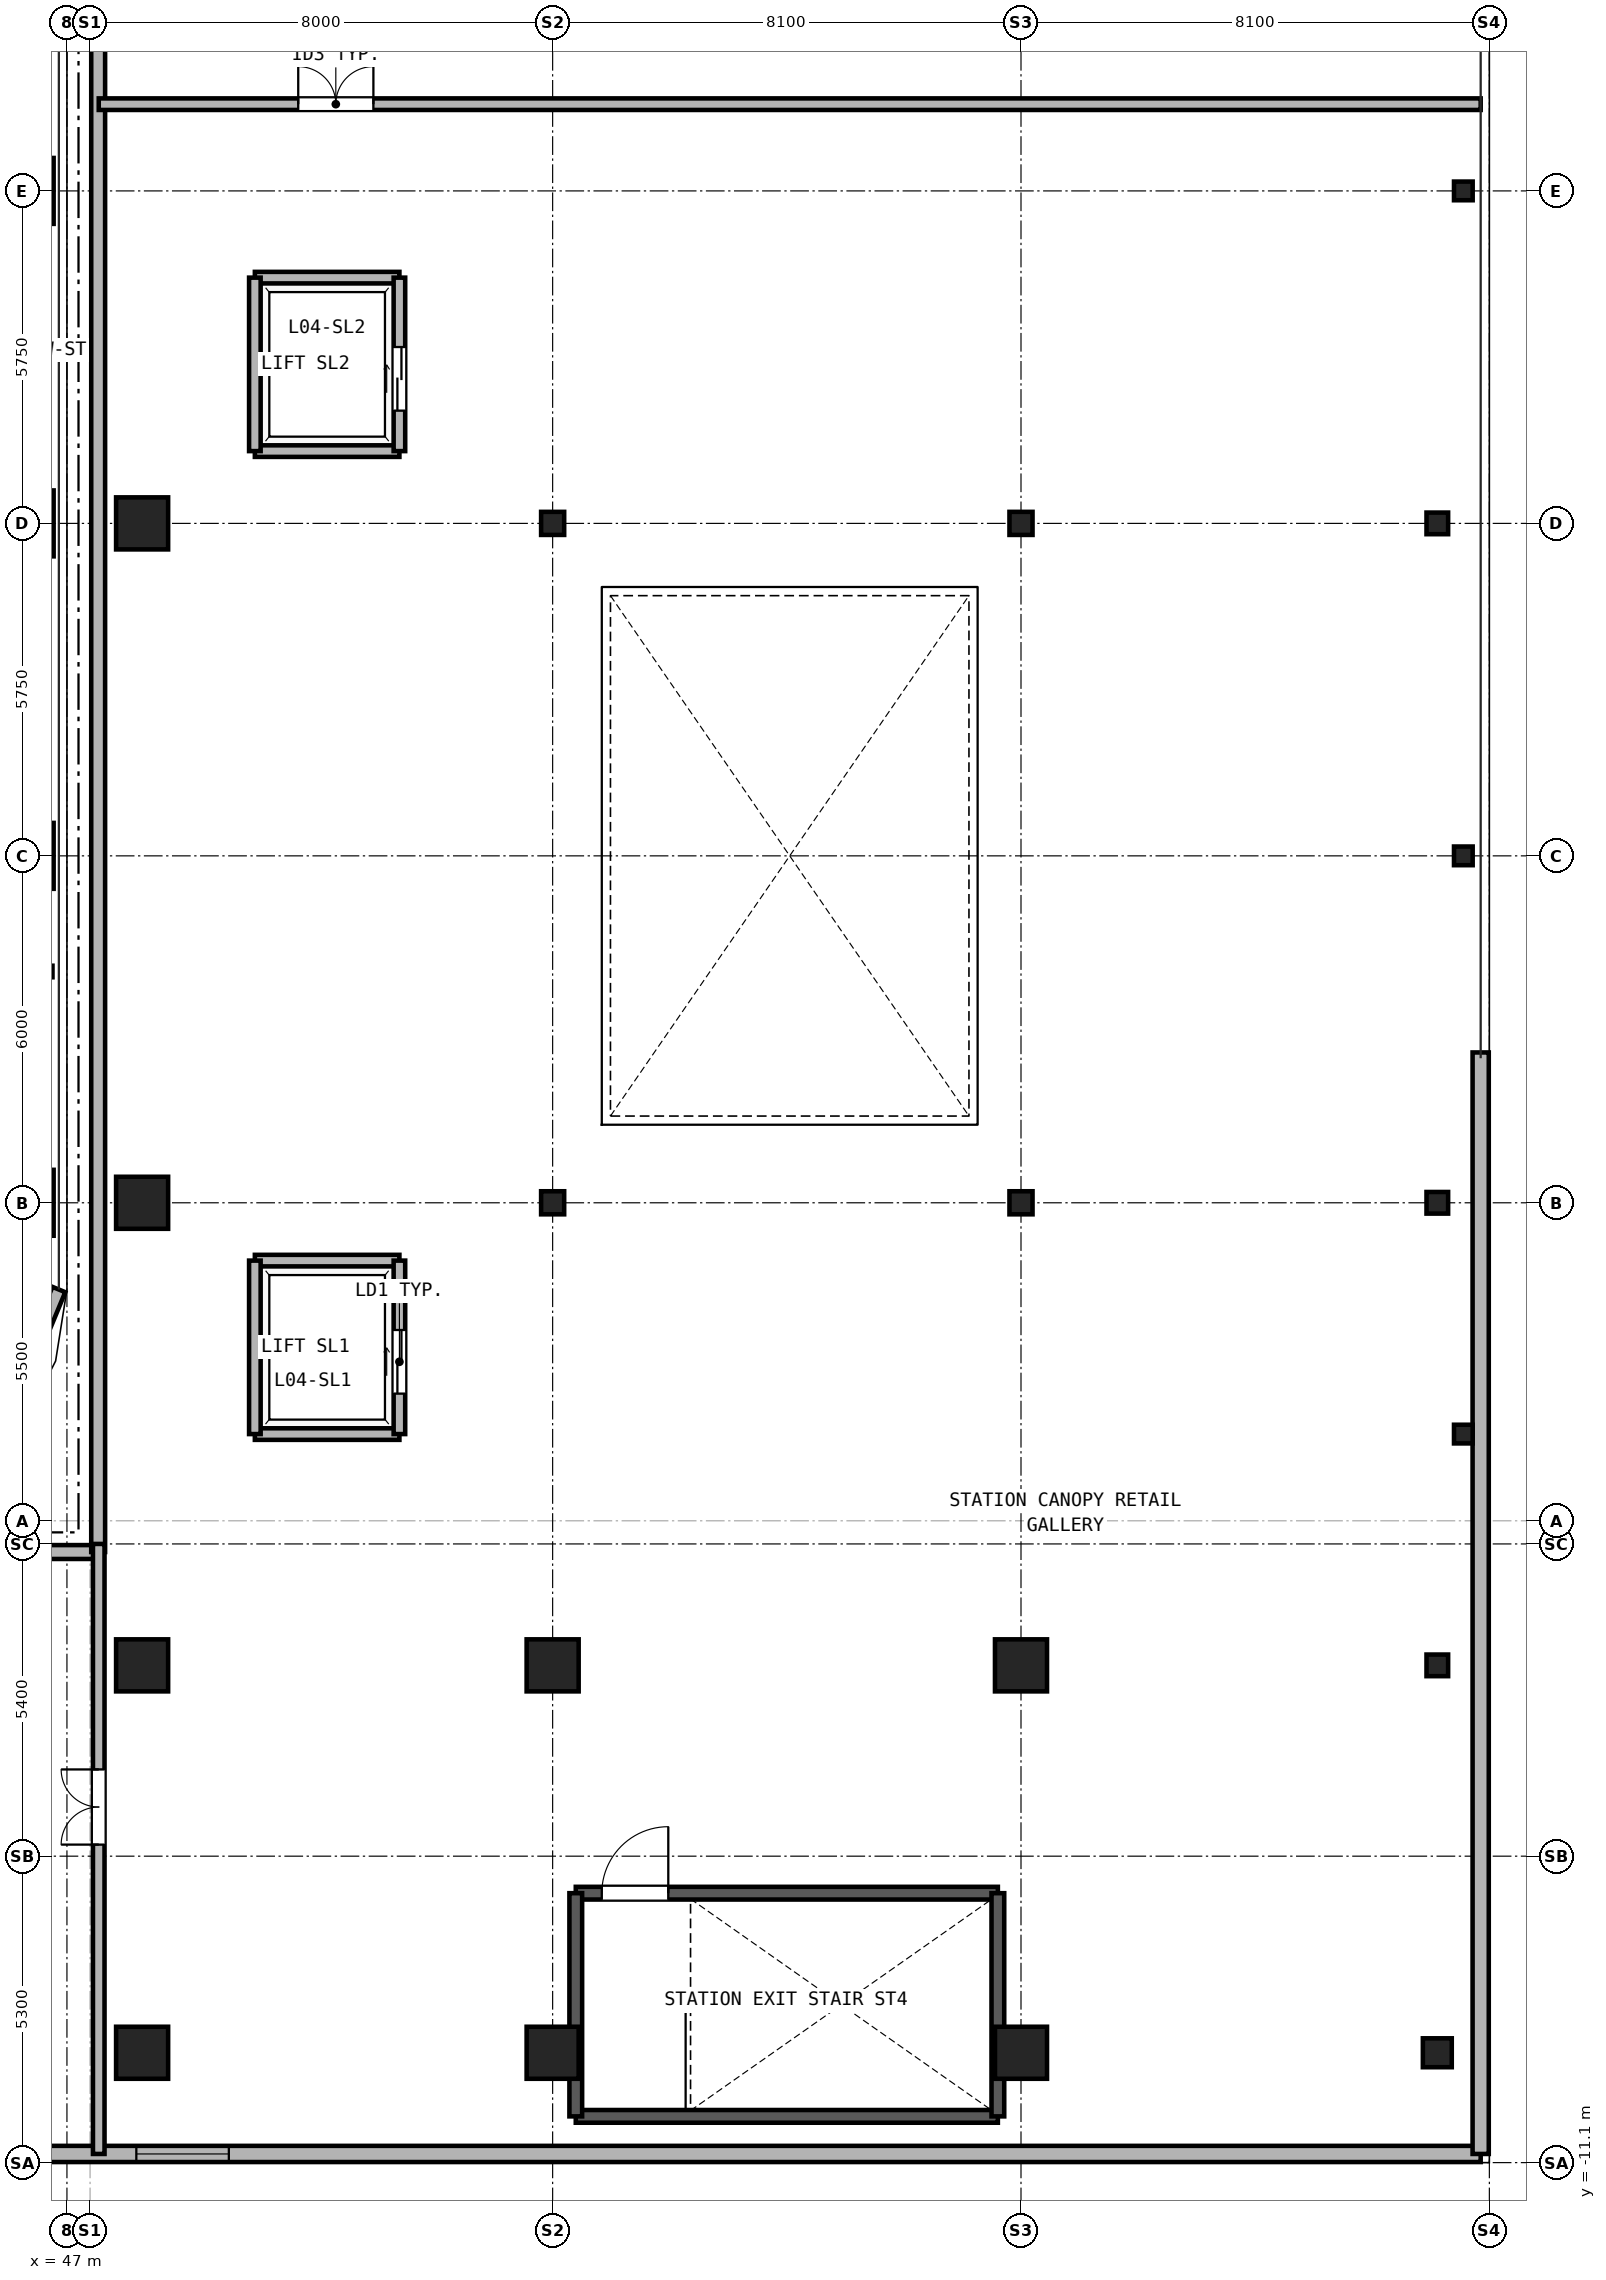
"""IFC4 building model, lengths in metres.
Left out: names, types, materials, properties, quantities, classifications, styles, units other than length and angle.
Written with IfcOpenShell. Run it as: python <this file> out.ifc"""

import sys

from ifc_helpers import new_model, si_unit, direction, frame, frame_2d, origin, origin_2d, place, context, subcontext, project, spatial, rectangle, hollow_rectangle, i_section, extrude, source, transform, mapped, element, fill, save


model = new_model("IFC4")
c1 = context("Model", 3, precision=1e-05, world=origin(), true_north=direction((0.0, 1.0)))
c2 = subcontext(c1, "Body", "Model", "MODEL_VIEW")
j1 = project(units=[si_unit("LENGTHUNIT", "METRE"), si_unit("PLANEANGLEUNIT", "RADIAN")], contexts=[c1])
p1 = place(None, origin())
s1 = spatial("IfcSite", under=j1, at=p1, CompositionType="ELEMENT")
p2 = place(p1, origin())
s2 = spatial("IfcBuilding", under=s1, at=p2, CompositionType="ELEMENT")
p3 = place(p2, frame((0.0, 0.0, 18.0)))
s3 = spatial("IfcBuildingStorey", under=s2, at=p3, CompositionType="ELEMENT", Elevation=18.0)
m1 = source(origin(), c2, "Body", "SweptSolid", [
    extrude(hollow_rectangle(XDim=1.14, YDim=1.14, WallThickness=0.07, at=origin_2d()), origin(), (0.0, 0.0, 1.0), 4.14),
])
for number, where, z_axis, x_axis in (
    (1, (46.2, 5.5, 0.0), (0.0, 0.0, 1.0), (1.0, 0.0, 0.0)),
    (2, (46.2, 11.5, 0.0), (0.0, 0.0, 1.0), (1.0, 0.0, 0.0)),
    (3, (46.2, 17.25, 0.0), (0.0, 0.0, 1.0), (1.0, 0.0, 0.0)),
    (4, (46.2, 23.0, 0.0), (0.0, 0.0, 1.0), (1.0, 0.0, 0.0)),
):
    element("IfcColumn", number, at=place(p3, frame(where, z_axis=z_axis, x_axis=x_axis)), inside=s3, PredefinedType="COLUMN", context=c2, shape_type="MappedRepresentation", body=[
        mapped(m1, transform((0.0, 0.0, 0.0), x_axis=(1.0, 0.0, 0.0), y_axis=(0.0, 1.0, 0.0), z_axis=(0.0, 0.0, 1.0), scale=1.0)),
    ])
m2 = source(origin(), c2, "Body", "SweptSolid", [
    extrude(hollow_rectangle(XDim=0.7, YDim=0.9, WallThickness=0.04, at=origin_2d()), origin(), (0.0, 0.0, 1.0), 4.2),
])
for number, where, z_axis, x_axis in (
    (5, (48.3, -9.2, 0.0), (0.0, 0.0, 1.0), (1.0, 0.0, 0.0)),
    (6, (48.3, -2.5, 0.0), (0.0, 0.0, 1.0), (1.0, 0.0, 0.0)),
    (7, (48.3, 5.5, 0.0), (0.0, 0.0, 1.0), (1.0, 0.0, 0.0)),
    (8, (48.3, 17.25, 0.0), (0.0, 0.0, 1.0), (1.0, 0.0, 0.0)),
    (9, (55.4, -9.2, 0.0), (0.0, 0.0, 1.0), (1.0, 0.0, 0.0)),
    (10, (55.4, -2.5, 0.0), (0.0, 0.0, 1.0), (1.0, 0.0, 0.0)),
):
    element("IfcColumn", number, at=place(p3, frame(where, z_axis=z_axis, x_axis=x_axis)), inside=s3, PredefinedType="COLUMN", context=c2, shape_type="MappedRepresentation", body=[
        mapped(m2, transform((0.0, 0.0, 0.0), x_axis=(1.0, 0.0, 0.0), y_axis=(0.0, 1.0, 0.0), z_axis=(0.0, 0.0, 1.0), scale=1.0)),
    ])
m3 = source(origin(), c2, "Body", "SweptSolid", [
    extrude(i_section(OverallWidth=0.399, OverallDepth=0.393, WebThickness=0.023, FlangeThickness=0.037, at=origin_2d()), origin(), (0.0, 0.0, 1.0), 4.2),
])
for number, where, z_axis, x_axis in (
    (11, (55.4, 5.5, 0.0), (0.0, 0.0, 1.0), (1.0, 0.0, 0.0)),
    (12, (55.4, 17.25, 0.0), (0.0, 0.0, 1.0), (1.0, 0.0, 0.0)),
):
    element("IfcColumn", number, at=place(p3, frame(where, z_axis=z_axis, x_axis=x_axis)), inside=s3, PredefinedType="COLUMN", context=c2, shape_type="MappedRepresentation", body=[
        mapped(m3, transform((0.0, 0.0, 0.0), x_axis=(1.0, 0.0, 0.0), y_axis=(0.0, 1.0, 0.0), z_axis=(0.0, 0.0, 1.0), scale=1.0)),
    ])
for number, where, z_axis, x_axis in (
    (13, (63.5, -9.2, 0.0), (0.0, 0.0, 1.0), (1.0, 0.0, 0.0)),
    (14, (63.5, -2.5, 0.0), (0.0, 0.0, 1.0), (1.0, 0.0, 0.0)),
):
    element("IfcColumn", number, at=place(p3, frame(where, z_axis=z_axis, x_axis=x_axis)), inside=s3, PredefinedType="COLUMN", context=c2, shape_type="MappedRepresentation", body=[
        mapped(m2, transform((0.0, 0.0, 0.0), x_axis=(1.0, 0.0, 0.0), y_axis=(0.0, 1.0, 0.0), z_axis=(0.0, 0.0, 1.0), scale=1.0)),
    ])
for number, where, z_axis, x_axis in (
    (15, (63.5, 5.5, 0.0), (0.0, 0.0, 1.0), (1.0, 0.0, 0.0)),
    (16, (63.5, 17.25, 0.0), (0.0, 0.0, 1.0), (1.0, 0.0, 0.0)),
):
    element("IfcColumn", number, at=place(p3, frame(where, z_axis=z_axis, x_axis=x_axis)), inside=s3, PredefinedType="COLUMN", context=c2, shape_type="MappedRepresentation", body=[
        mapped(m3, transform((0.0, 0.0, 0.0), x_axis=(1.0, 0.0, 0.0), y_axis=(0.0, 1.0, 0.0), z_axis=(0.0, 0.0, 1.0), scale=1.0)),
    ])
m4 = source(origin(), c2, "Body", "SweptSolid", [
    extrude(hollow_rectangle(XDim=0.5, YDim=0.5, WallThickness=0.025, at=origin_2d()), origin(), (0.0, 0.0, 1.0), 4.2),
])
p4 = place(p3, frame((70.7, -9.2, 0.0), z_axis=(0.0, 0.0, 1.0), x_axis=(1.0, 0.0, 0.0)))
e17 = element("IfcColumn", 17, at=p4, inside=s3, PredefinedType="COLUMN", context=c2, shape_type="MappedRepresentation", body=[
    mapped(m4, transform((0.0, 0.0, 0.0), x_axis=(1.0, 0.0, 0.0), y_axis=(0.0, 1.0, 0.0), z_axis=(0.0, 0.0, 1.0), scale=1.0)),
])
m5 = source(origin(), c2, "Body", "SweptSolid", [
    extrude(i_section(OverallWidth=0.374, OverallDepth=0.372, WebThickness=0.016, FlangeThickness=0.026, at=origin_2d()), origin(), (0.0, 0.0, 1.0), 4.2),
])
for number, where, z_axis, x_axis in (
    (18, (70.7, -2.5, 0.0), (0.0, 0.0, 1.0), (1.0, 0.0, 0.0)),
    (19, (70.7, 5.5, 0.0), (0.0, 0.0, 1.0), (1.0, 0.0, 0.0)),
    (20, (70.7, 17.25, 0.0), (0.0, 0.0, 1.0), (1.0, 0.0, 0.0)),
):
    element("IfcColumn", number, at=place(p3, frame(where, z_axis=z_axis, x_axis=x_axis)), inside=s3, PredefinedType="COLUMN", context=c2, shape_type="MappedRepresentation", body=[
        mapped(m5, transform((0.0, 0.0, 0.0), x_axis=(1.0, 0.0, 0.0), y_axis=(0.0, 1.0, 0.0), z_axis=(0.0, 0.0, 1.0), scale=1.0)),
    ])
m6 = source(origin(), c2, "Body", "SweptSolid", [
    extrude(i_section(OverallWidth=0.309, OverallDepth=0.323, WebThickness=0.014, FlangeThickness=0.023, at=origin_2d()), origin(), (0.0, 0.0, 1.0), 4.2),
])
for number, where, z_axis, x_axis in (
    (21, (71.15, 1.5, 0.0), (0.0, 0.0, 1.0), (1.0, 0.0, 0.0)),
    (22, (71.15, 11.5, 0.0), (0.0, 0.0, 1.0), (1.0, 0.0, 0.0)),
    (23, (71.15, 23.0, 0.0), (0.0, 0.0, 1.0), (1.0, 0.0, 0.0)),
):
    element("IfcColumn", number, at=place(p3, frame(where, z_axis=z_axis, x_axis=x_axis)), inside=s3, PredefinedType="PILASTER", context=c2, shape_type="MappedRepresentation", body=[
        mapped(m6, transform((0.0, 0.0, 0.0), x_axis=(1.0, 0.0, 0.0), y_axis=(0.0, 1.0, 0.0), z_axis=(0.0, 0.0, 1.0), scale=1.0)),
    ])
p5 = place(p3, frame((45.729, 1.271, 0.0), z_axis=(0.0, 0.0, 1.0), x_axis=(0.382689947836, 0.923876833688, 0.0)))
e24 = element("IfcWall", 24, at=p5, inside=s3, PredefinedType="SOLIDWALL", context=c2, shape_type="SweptSolid", body=[
    extrude(rectangle(XDim=2.954, YDim=0.24, at=frame_2d((1.477, 0.0))), origin(), (0.0, 0.0, 1.0), 4.14),
])
p6 = place(p3, frame((41.9, -10.95, 0.0), z_axis=(0.0, 0.0, 1.0), x_axis=(1.0, 0.0, 0.0)))
e25 = element("IfcWall", 25, at=p6, inside=s3, PredefinedType="SOLIDWALL", context=c2, shape_type="SweptSolid", body=[
    extrude(rectangle(XDim=29.55, YDim=0.28, at=frame_2d((14.775, 0.0))), origin(), (0.0, 0.0, 1.0), 4.2),
])
p7 = place(p6, frame((6.3, 0.0, 1.1)))
e26 = element("IfcOpeningElement", 26, at=p7, cuts=e25, PredefinedType="OPENING", context=c2, shape_type="SweptSolid", body=[
    extrude(rectangle(XDim=1.6, YDim=1.4, at=frame_2d((0.8, 0.7))), frame((0.0, 0.15, 0.0), z_axis=(0.0, -1.0, 0.0), x_axis=(1.0, 0.0, 0.0)), (0.0, 0.0, 1.0), 0.3),
])
p8 = place(p3, frame((71.45, -10.95, 0.0), z_axis=(0.0, 0.0, 1.0), x_axis=(0.0, 1.0, 0.0)))
e27 = element("IfcWall", 27, at=p8, inside=s3, PredefinedType="SOLIDWALL", context=c2, shape_type="SweptSolid", body=[
    extrude(rectangle(XDim=19.05, YDim=0.28, at=frame_2d((9.525, 0.0))), origin(), (0.0, 0.0, 1.0), 4.2),
])
p9 = place(p3, frame((0.2, -0.54, 0.0), z_axis=(0.0, 0.0, 1.0), x_axis=(1.0, 0.0, 0.0)))
e28 = element("IfcWall", 28, at=p9, inside=s3, PredefinedType="SOLIDWALL", context=c2, shape_type="SweptSolid", body=[
    extrude(rectangle(XDim=47.34, YDim=0.24, at=frame_2d((23.67, 0.0))), origin(), (0.0, 0.0, 1.0), 4.2),
])
p10 = place(p3, frame((47.54, -0.54, 0.0), z_axis=(0.0, 0.0, 1.0), x_axis=(0.0, 1.0, 0.0)))
e29 = element("IfcWall", 29, at=p10, inside=s3, PredefinedType="SOLIDWALL", context=c2, shape_type="SweptSolid", body=[
    extrude(rectangle(XDim=40.89, YDim=0.24, at=frame_2d((20.445, 0.0))), origin(), (0.0, 0.0, 1.0), 4.2),
])
p11 = place(p3, frame((55.8, -10.3, 0.0), z_axis=(0.0, 0.0, 1.0), x_axis=(1.0, 0.0, 0.0)))
e30 = element("IfcWall", 30, at=p11, inside=s3, PredefinedType="SOLIDWALL", context=c2, shape_type="SweptSolid", body=[
    extrude(rectangle(XDim=7.3, YDim=0.22, at=frame_2d((3.65, 0.0))), origin(), (0.0, 0.0, 1.0), 4.14),
])
p12 = place(p3, frame((55.8, -6.44, 0.0), z_axis=(0.0, 0.0, 1.0), x_axis=(1.0, 0.0, 0.0)))
e31 = element("IfcWall", 31, at=p12, inside=s3, PredefinedType="SOLIDWALL", context=c2, shape_type="SweptSolid", body=[
    extrude(rectangle(XDim=7.3, YDim=0.22, at=frame_2d((3.65, 0.0))), origin(), (0.0, 0.0, 1.0), 4.14),
])
p13 = place(p12, frame((0.45, 0.0, 0.0)))
e32 = element("IfcOpeningElement", 32, at=p13, cuts=e31, PredefinedType="OPENING", context=c2, shape_type="SweptSolid", body=[
    extrude(rectangle(XDim=1.15, YDim=2.2, at=frame_2d((0.575, 1.1))), frame((0.0, 0.12, 0.0), z_axis=(0.0, -1.0, 0.0), x_axis=(1.0, 0.0, 0.0)), (0.0, 0.0, 1.0), 0.24),
])
for number, where, z_axis, x_axis in (
    (33, (55.8, -10.3, 0.0), (0.0, 0.0, 1.0), (0.0, 1.0, 0.0)),
    (34, (63.1, -10.3, 0.0), (0.0, 0.0, 1.0), (0.0, 1.0, 0.0)),
):
    element("IfcWall", number, at=place(p3, frame(where, z_axis=z_axis, x_axis=x_axis)), inside=s3, PredefinedType="SOLIDWALL", context=c2, shape_type="SweptSolid", body=[
        extrude(rectangle(XDim=3.86, YDim=0.22, at=frame_2d((1.93, 0.0))), origin(), (0.0, 0.0, 1.0), 4.14),
    ])
for number, where, z_axis, x_axis in (
    (35, (50.25, 1.5, 0.0), (0.0, 0.0, 1.0), (1.0, 0.0, 0.0)),
    (36, (50.25, 4.5, 0.0), (0.0, 0.0, 1.0), (1.0, 0.0, 0.0)),
):
    element("IfcWall", number, at=place(p3, frame(where, z_axis=z_axis, x_axis=x_axis)), inside=s3, PredefinedType="PARTITIONING", context=c2, shape_type="SweptSolid", body=[
        extrude(rectangle(XDim=2.5, YDim=0.2, at=frame_2d((1.25, 0.0))), origin(), (0.0, 0.0, 1.0), 4.14),
    ])
p14 = place(p3, frame((50.25, 1.5, 0.0), z_axis=(0.0, 0.0, 1.0), x_axis=(0.0, 1.0, 0.0)))
e37 = element("IfcWall", 37, at=p14, inside=s3, PredefinedType="PARTITIONING", context=c2, shape_type="SweptSolid", body=[
    extrude(rectangle(XDim=3.0, YDim=0.2, at=frame_2d((1.5, 0.0))), origin(), (0.0, 0.0, 1.0), 4.14),
])
p15 = place(p3, frame((52.75, 1.5, 0.0), z_axis=(0.0, 0.0, 1.0), x_axis=(0.0, 1.0, 0.0)))
e38 = element("IfcWall", 38, at=p15, inside=s3, PredefinedType="PARTITIONING", context=c2, shape_type="SweptSolid", body=[
    extrude(rectangle(XDim=3.0, YDim=0.2, at=frame_2d((1.5, 0.0))), origin(), (0.0, 0.0, 1.0), 4.14),
])
p16 = place(p15, frame((0.7, 0.0, 0.0)))
e39 = element("IfcOpeningElement", 39, at=p16, cuts=e38, PredefinedType="OPENING", context=c2, shape_type="SweptSolid", body=[
    extrude(rectangle(XDim=1.1, YDim=2.25, at=frame_2d((0.55, 1.125))), frame((0.0, 0.11, 0.0), z_axis=(0.0, -1.0, 0.0), x_axis=(1.0, 0.0, 0.0)), (0.0, 0.0, 1.0), 0.22),
])
for number, where, z_axis, x_axis in (
    (40, (50.25, 18.5, 0.0), (0.0, 0.0, 1.0), (1.0, 0.0, 0.0)),
    (41, (50.25, 21.5, 0.0), (0.0, 0.0, 1.0), (1.0, 0.0, 0.0)),
):
    element("IfcWall", number, at=place(p3, frame(where, z_axis=z_axis, x_axis=x_axis)), inside=s3, PredefinedType="PARTITIONING", context=c2, shape_type="SweptSolid", body=[
        extrude(rectangle(XDim=2.5, YDim=0.2, at=frame_2d((1.25, 0.0))), origin(), (0.0, 0.0, 1.0), 4.14),
    ])
p17 = place(p3, frame((50.25, 18.5, 0.0), z_axis=(0.0, 0.0, 1.0), x_axis=(0.0, 1.0, 0.0)))
e42 = element("IfcWall", 42, at=p17, inside=s3, PredefinedType="PARTITIONING", context=c2, shape_type="SweptSolid", body=[
    extrude(rectangle(XDim=3.0, YDim=0.2, at=frame_2d((1.5, 0.0))), origin(), (0.0, 0.0, 1.0), 4.14),
])
p18 = place(p3, frame((52.75, 18.5, 0.0), z_axis=(0.0, 0.0, 1.0), x_axis=(0.0, 1.0, 0.0)))
e43 = element("IfcWall", 43, at=p18, inside=s3, PredefinedType="PARTITIONING", context=c2, shape_type="SweptSolid", body=[
    extrude(rectangle(XDim=3.0, YDim=0.2, at=frame_2d((1.5, 0.0))), origin(), (0.0, 0.0, 1.0), 4.14),
])
p19 = place(p18, frame((0.7, 0.0, 0.0)))
e44 = element("IfcOpeningElement", 44, at=p19, cuts=e43, PredefinedType="OPENING", context=c2, shape_type="SweptSolid", body=[
    extrude(rectangle(XDim=1.1, YDim=2.25, at=frame_2d((0.55, 1.125))), frame((0.0, 0.11, 0.0), z_axis=(0.0, -1.0, 0.0), x_axis=(1.0, 0.0, 0.0)), (0.0, 0.0, 1.0), 0.22),
])
p20 = place(p3, frame((47.55, 24.5, 0.0), z_axis=(0.0, 0.0, 1.0), x_axis=(1.0, 0.0, 0.0)))
e45 = element("IfcWall", 45, at=p20, inside=s3, PredefinedType="PARTITIONING", context=c2, shape_type="SweptSolid", body=[
    extrude(rectangle(XDim=23.9, YDim=0.2, at=frame_2d((11.95, 0.0))), origin(), (0.0, 0.0, 1.0), 4.14),
])
p21 = place(p20, frame((3.45, 0.0, 0.0)))
e46 = element("IfcOpeningElement", 46, at=p21, cuts=e45, PredefinedType="OPENING", context=c2, shape_type="SweptSolid", body=[
    extrude(rectangle(XDim=1.3, YDim=2.2, at=frame_2d((0.65, 1.1))), frame((0.0, 0.11, 0.0), z_axis=(0.0, -1.0, 0.0), x_axis=(1.0, 0.0, 0.0)), (0.0, 0.0, 1.0), 0.22),
])
p22 = place(p3, frame((47.55, -10.95, 0.0), z_axis=(0.0, 0.0, 1.0), x_axis=(0.0, 1.0, 0.0)))
e47 = element("IfcWall", 47, at=p22, inside=s3, PredefinedType="PARTITIONING", context=c2, shape_type="SweptSolid", body=[
    extrude(rectangle(XDim=10.55, YDim=0.2, at=frame_2d((5.275, 0.0))), origin(), (0.0, 0.0, 1.0), 4.14),
])
p23 = place(p22, frame((5.35, 0.0, 0.0)))
e48 = element("IfcOpeningElement", 48, at=p23, cuts=e47, PredefinedType="OPENING", context=c2, shape_type="SweptSolid", body=[
    extrude(rectangle(XDim=1.3, YDim=2.2, at=frame_2d((0.65, 1.1))), frame((0.0, 0.11, 0.0), z_axis=(0.0, -1.0, 0.0), x_axis=(1.0, 0.0, 0.0)), (0.0, 0.0, 1.0), 0.22),
])
p24 = place(p7, origin())
e49 = element("IfcWindow", 49, at=p24, inside=s3, PartitioningType="SINGLE_PANEL", PredefinedType="WINDOW", context=c2, shape_type="SweptSolid", body=[
    extrude(rectangle(XDim=1.6, YDim=1.4, at=frame_2d((0.8, 0.7))), frame((0.0, 0.03, 0.0), z_axis=(0.0, -1.0, 0.0), x_axis=(1.0, 0.0, 0.0)), (0.0, 0.0, 1.0), 0.06),
])
fill(e26, e49)
p25 = place(p13, origin())
e50 = element("IfcDoor", 50, at=p25, inside=s3, OperationType="SINGLE_SWING_RIGHT", PredefinedType="DOOR", context=c2, shape_type="SweptSolid", body=[
    extrude(rectangle(XDim=1.15, YDim=2.2, at=frame_2d((0.575, 1.1))), frame((0.0, 0.025, 0.0), z_axis=(0.0, -1.0, 0.0), x_axis=(1.0, 0.0, 0.0)), (0.0, 0.0, 1.0), 0.05),
])
fill(e32, e50)
p26 = place(p16, origin())
e51 = element("IfcDoor", 51, at=p26, inside=s3, OperationType="DOUBLE_DOOR_SLIDING", PredefinedType="DOOR", context=c2, shape_type="SweptSolid", body=[
    extrude(rectangle(XDim=1.1, YDim=2.25, at=frame_2d((0.55, 1.125))), frame((0.0, 0.025, 0.0), z_axis=(0.0, -1.0, 0.0), x_axis=(1.0, 0.0, 0.0)), (0.0, 0.0, 1.0), 0.05),
])
fill(e39, e51)
p27 = place(p19, origin())
e52 = element("IfcDoor", 52, at=p27, inside=s3, OperationType="DOUBLE_DOOR_SLIDING", PredefinedType="DOOR", context=c2, shape_type="SweptSolid", body=[
    extrude(rectangle(XDim=1.1, YDim=2.25, at=frame_2d((0.55, 1.125))), frame((0.0, 0.025, 0.0), z_axis=(0.0, -1.0, 0.0), x_axis=(1.0, 0.0, 0.0)), (0.0, 0.0, 1.0), 0.05),
])
fill(e44, e52)
p28 = place(p21, origin())
e53 = element("IfcDoor", 53, at=p28, inside=s3, OperationType="DOUBLE_DOOR_SINGLE_SWING", PredefinedType="DOOR", context=c2, shape_type="SweptSolid", body=[
    extrude(rectangle(XDim=1.3, YDim=2.2, at=frame_2d((0.65, 1.1))), frame((0.0, 0.025, 0.0), z_axis=(0.0, -1.0, 0.0), x_axis=(1.0, 0.0, 0.0)), (0.0, 0.0, 1.0), 0.05),
])
fill(e46, e53)
p29 = place(p23, origin())
e54 = element("IfcDoor", 54, at=p29, inside=s3, OperationType="DOUBLE_DOOR_SINGLE_SWING", PredefinedType="DOOR", context=c2, shape_type="SweptSolid", body=[
    extrude(rectangle(XDim=1.3, YDim=2.2, at=frame_2d((0.65, 1.1))), frame((0.0, 0.025, 0.0), z_axis=(0.0, -1.0, 0.0), x_axis=(1.0, 0.0, 0.0)), (0.0, 0.0, 1.0), 0.05),
])
fill(e48, e54)
save(model, sys.argv[1])
